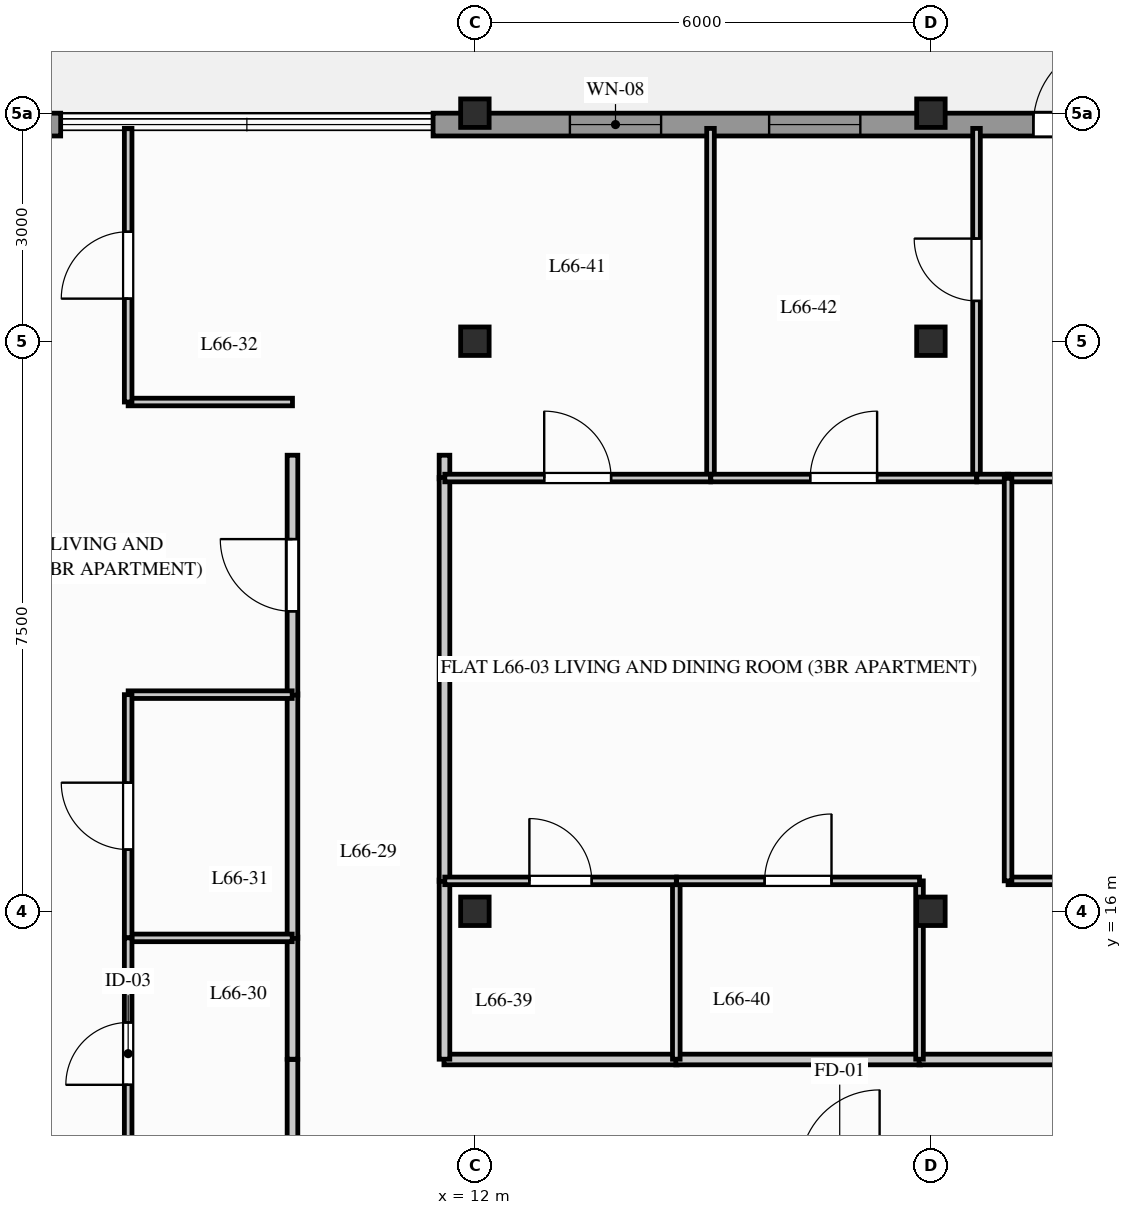
"""IFC4 building model, lengths in metres.
Left out: names, types, materials, properties, quantities, classifications, styles, units other than length and angle.
Written with IfcOpenShell. Run it as: python <this file> out.ifc"""

import sys

from ifc_helpers import new_model, si_unit, direction, frame, frame_2d, origin, origin_2d, place, context, subcontext, project, spatial, rectangle, i_section, extrude, element, fill, save


model = new_model("IFC4")
c1 = context("Model", 3, precision=1e-05, world=origin(), true_north=direction((0.0, 1.0)))
c2 = subcontext(c1, "Body", "Model", "MODEL_VIEW")
j1 = project(units=[si_unit("LENGTHUNIT", "METRE"), si_unit("PLANEANGLEUNIT", "RADIAN")], contexts=[c1])
p1 = place(None, origin())
s1 = spatial("IfcSite", under=j1, at=p1, CompositionType="ELEMENT")
p2 = place(p1, origin())
s2 = spatial("IfcBuilding", under=s1, at=p2, CompositionType="ELEMENT")
p3 = place(p2, frame((0.0, 0.0, 218.0)))
s3 = spatial("IfcBuildingStorey", under=s2, at=p3, CompositionType="ELEMENT", Elevation=218.0)
for number, where, z_axis, x_axis in (
    (1, (12.0, 16.0, 0.0), (0.0, 0.0, 1.0), (1.0, 0.0, 0.0)),
    (2, (12.0, 23.5, 0.0), (0.0, 0.0, 1.0), (1.0, 0.0, 0.0)),
    (3, (12.0, 26.5, 0.0), (0.0, 0.0, 1.0), (1.0, 0.0, 0.0)),
    (4, (18.0, 16.0, 0.0), (0.0, 0.0, 1.0), (1.0, 0.0, 0.0)),
    (5, (18.0, 23.5, 0.0), (0.0, 0.0, 1.0), (1.0, 0.0, 0.0)),
    (6, (18.0, 26.5, 0.0), (0.0, 0.0, 1.0), (1.0, 0.0, 0.0)),
):
    element("IfcColumn", number, at=place(p3, frame(where, z_axis=z_axis, x_axis=x_axis)), inside=s3, PredefinedType="COLUMN", context=c2, shape_type="SweptSolid", body=[
        extrude(i_section(OverallWidth=0.375, OverallDepth=0.375, WebThickness=0.017, FlangeThickness=0.027, FilletRadius=0.015, at=origin_2d()), origin(), (0.0, 0.0, 1.0), 3.1),
    ])
p4 = place(p3, frame((2.5, 26.35, 0.0), z_axis=(0.0, 0.0, 1.0), x_axis=(1.0, 0.0, 0.0)))
e7 = element("IfcWall", 7, at=p4, inside=s3, PredefinedType="STANDARD", context=c2, shape_type="SweptSolid", body=[
    extrude(rectangle(XDim=4.05, YDim=0.3, at=frame_2d((2.025, 0.0))), origin(), (0.0, 0.0, 1.0), 2.89),
])
p5 = place(p3, frame((11.45, 26.35, 0.0), z_axis=(0.0, 0.0, 1.0), x_axis=(1.0, 0.0, 0.0)))
e8 = element("IfcWall", 8, at=p5, inside=s3, PredefinedType="STANDARD", context=c2, shape_type="SweptSolid", body=[
    extrude(rectangle(XDim=16.35, YDim=0.3, at=frame_2d((8.175, 0.0))), origin(), (0.0, 0.0, 1.0), 2.332),
])
p6 = place(p5, frame((7.898, 0.0, 0.0)))
e9 = element("IfcOpeningElement", 9, at=p6, cuts=e8, PredefinedType="OPENING", context=c2, shape_type="SweptSolid", body=[
    extrude(rectangle(XDim=1.1, YDim=2.2, at=frame_2d((0.55, 1.1))), frame((0.0, 0.16, 0.0), z_axis=(0.0, -1.0, 0.0), x_axis=(1.0, 0.0, 0.0)), (0.0, 0.0, 1.0), 0.32),
])
p7 = place(p5, frame((1.8, 0.0, 0.512)))
e10 = element("IfcOpeningElement", 10, at=p7, cuts=e8, PredefinedType="OPENING", context=c2, shape_type="SweptSolid", body=[
    extrude(rectangle(XDim=1.2, YDim=1.6, at=frame_2d((0.6, 0.8))), frame((0.0, 0.16, 0.0), z_axis=(0.0, -1.0, 0.0), x_axis=(1.0, 0.0, 0.0)), (0.0, 0.0, 1.0), 0.32),
])
p8 = place(p5, frame((4.421, 0.0, 0.512)))
e11 = element("IfcOpeningElement", 11, at=p8, cuts=e8, PredefinedType="OPENING", context=c2, shape_type="SweptSolid", body=[
    extrude(rectangle(XDim=1.2, YDim=1.6, at=frame_2d((0.6, 0.8))), frame((0.0, 0.16, 0.0), z_axis=(0.0, -1.0, 0.0), x_axis=(1.0, 0.0, 0.0)), (0.0, 0.0, 1.0), 0.32),
])
p9 = place(p3, frame((9.6, 12.6, 0.0), z_axis=(0.0, 0.0, 1.0), x_axis=(0.0, 1.0, 0.0)))
e12 = element("IfcWall", 12, at=p9, inside=s3, PredefinedType="PARTITIONING", context=c2, shape_type="SweptSolid", body=[
    extrude(rectangle(XDim=1.45, YDim=0.14, at=frame_2d((0.725, 0.0))), origin(), (0.0, 0.0, 1.0), 2.89),
])
p10 = place(p3, frame((11.593, 14.05, 0.0), z_axis=(0.0, 0.0, 1.0), x_axis=(1.0, 0.0, 0.0)))
e13 = element("IfcWall", 13, at=p10, inside=s3, PredefinedType="PARTITIONING", context=c2, shape_type="SweptSolid", body=[
    extrude(rectangle(XDim=3.069, YDim=0.14, at=frame_2d((1.534, 0.0))), origin(), (0.0, 0.0, 1.0), 2.325),
])
p11 = place(p3, frame((14.643, 14.05, 0.0), z_axis=(0.0, 0.0, 1.0), x_axis=(1.0, 0.0, 0.0)))
e14 = element("IfcWall", 14, at=p11, inside=s3, PredefinedType="PARTITIONING", context=c2, shape_type="SweptSolid", body=[
    extrude(rectangle(XDim=3.219, YDim=0.14, at=frame_2d((1.609, 0.0))), origin(), (0.0, 0.0, 1.0), 2.89),
])
p12 = place(p3, frame((17.843, 14.05, 0.0), z_axis=(0.0, 0.0, 1.0), x_axis=(1.0, 0.0, 0.0)))
e15 = element("IfcWall", 15, at=p12, inside=s3, PredefinedType="PARTITIONING", context=c2, shape_type="SweptSolid", body=[
    extrude(rectangle(XDim=6.668, YDim=0.14, at=frame_2d((3.334, 0.0))), origin(), (0.0, 0.0, 1.0), 2.325),
])
p13 = place(p12, frame((2.859, 0.0, 0.0)))
e16 = element("IfcOpeningElement", 16, at=p13, cuts=e15, PredefinedType="OPENING", context=c2, shape_type="SweptSolid", body=[
    extrude(rectangle(XDim=0.95, YDim=2.05, at=frame_2d((0.475, 1.025))), frame((0.0, 0.08, 0.0), z_axis=(0.0, -1.0, 0.0), x_axis=(1.0, 0.0, 0.0)), (0.0, 0.0, 1.0), 0.16),
])
p14 = place(p3, frame((9.6, 14.054, 0.0), z_axis=(0.0, 0.0, 1.0), x_axis=(0.0, 1.0, 0.0)))
e17 = element("IfcWall", 17, at=p14, inside=s3, PredefinedType="PARTITIONING", context=c2, shape_type="SweptSolid", body=[
    extrude(rectangle(XDim=1.607, YDim=0.14, at=frame_2d((0.804, 0.0))), origin(), (0.0, 0.0, 1.0), 2.89),
])
p15 = place(p3, frame((9.6, 15.643, 0.0), z_axis=(0.0, 0.0, 1.0), x_axis=(0.0, 1.0, 0.0)))
e18 = element("IfcWall", 18, at=p15, inside=s3, PredefinedType="PARTITIONING", context=c2, shape_type="SweptSolid", body=[
    extrude(rectangle(XDim=3.219, YDim=0.14, at=frame_2d((1.609, 0.0))), origin(), (0.0, 0.0, 1.0), 2.325),
])
p16 = place(p3, frame((9.6, 18.843, 0.0), z_axis=(0.0, 0.0, 1.0), x_axis=(0.0, 1.0, 0.0)))
e19 = element("IfcWall", 19, at=p16, inside=s3, PredefinedType="PARTITIONING", context=c2, shape_type="SweptSolid", body=[
    extrude(rectangle(XDim=3.157, YDim=0.14, at=frame_2d((1.579, 0.0))), origin(), (0.0, 0.0, 1.0), 2.614),
])
p17 = place(p16, frame((1.104, 0.0, 0.0)))
e20 = element("IfcOpeningElement", 20, at=p17, cuts=e19, PredefinedType="OPENING", context=c2, shape_type="SweptSolid", body=[
    extrude(rectangle(XDim=0.95, YDim=2.05, at=frame_2d((0.475, 1.025))), frame((0.0, 0.08, 0.0), z_axis=(0.0, -1.0, 0.0), x_axis=(1.0, 0.0, 0.0)), (0.0, 0.0, 1.0), 0.16),
])
p18 = place(p3, frame((11.6, 14.054, 0.0), z_axis=(0.0, 0.0, 1.0), x_axis=(0.0, 1.0, 0.0)))
e21 = element("IfcWall", 21, at=p18, inside=s3, PredefinedType="PARTITIONING", context=c2, shape_type="SweptSolid", body=[
    extrude(rectangle(XDim=2.357, YDim=0.14, at=frame_2d((1.179, 0.0))), origin(), (0.0, 0.0, 1.0), 2.325),
])
p19 = place(p3, frame((11.6, 21.689, 0.0), z_axis=(0.0, 0.0, 1.0), x_axis=(0.0, 1.0, 0.0)))
e22 = element("IfcWall", 22, at=p19, inside=s3, PredefinedType="PARTITIONING", context=c2, shape_type="SweptSolid", body=[
    extrude(rectangle(XDim=0.311, YDim=0.14, at=frame_2d((0.156, 0.0))), origin(), (0.0, 0.0, 1.0), 2.89),
])
p20 = place(p3, frame((11.6, 16.393, 0.0), z_axis=(0.0, 0.0, 1.0), x_axis=(0.0, 1.0, 0.0)))
e23 = element("IfcWall", 23, at=p20, inside=s3, PredefinedType="PARTITIONING", context=c2, shape_type="SweptSolid", body=[
    extrude(rectangle(XDim=5.315, YDim=0.14, at=frame_2d((2.657, 0.0))), origin(), (0.0, 0.0, 1.0), 2.614),
])
p21 = place(p3, frame((7.438, 15.65, 0.0), z_axis=(0.0, 0.0, 1.0), x_axis=(1.0, 0.0, 0.0)))
e24 = element("IfcWall", 24, at=p21, inside=s3, PredefinedType="PARTITIONING", context=c2, shape_type="SweptSolid", body=[
    extrude(rectangle(XDim=2.158, YDim=0.1, at=frame_2d((1.079, 0.0))), origin(), (0.0, 0.0, 1.0), 2.89),
])
p22 = place(p3, frame((7.438, 12.604, 0.0), z_axis=(0.0, 0.0, 1.0), x_axis=(0.0, 1.0, 0.0)))
e25 = element("IfcWall", 25, at=p22, inside=s3, PredefinedType="PARTITIONING", context=c2, shape_type="SweptSolid", body=[
    extrude(rectangle(XDim=3.046, YDim=0.1, at=frame_2d((1.523, 0.0))), origin(), (0.0, 0.0, 1.0), 2.89),
])
p23 = place(p22, frame((1.113, 0.0, 0.0)))
e26 = element("IfcOpeningElement", 26, at=p23, cuts=e25, PredefinedType="OPENING", context=c2, shape_type="SweptSolid", body=[
    extrude(rectangle(XDim=0.82, YDim=2.02, at=frame_2d((0.41, 1.01))), frame((0.0, 0.06, 0.0), z_axis=(0.0, -1.0, 0.0), x_axis=(1.0, 0.0, 0.0)), (0.0, 0.0, 1.0), 0.12),
])
p24 = place(p3, frame((7.438, 18.85, 0.0), z_axis=(0.0, 0.0, 1.0), x_axis=(1.0, 0.0, 0.0)))
e27 = element("IfcWall", 27, at=p24, inside=s3, PredefinedType="PARTITIONING", context=c2, shape_type="SweptSolid", body=[
    extrude(rectangle(XDim=2.158, YDim=0.1, at=frame_2d((1.079, 0.0))), origin(), (0.0, 0.0, 1.0), 2.89),
])
p25 = place(p3, frame((7.438, 15.654, 0.0), z_axis=(0.0, 0.0, 1.0), x_axis=(0.0, 1.0, 0.0)))
e28 = element("IfcWall", 28, at=p25, inside=s3, PredefinedType="PARTITIONING", context=c2, shape_type="SweptSolid", body=[
    extrude(rectangle(XDim=3.196, YDim=0.1, at=frame_2d((1.598, 0.0))), origin(), (0.0, 0.0, 1.0), 2.325),
])
p26 = place(p25, frame((1.158, 0.0, 0.0)))
e29 = element("IfcOpeningElement", 29, at=p26, cuts=e28, PredefinedType="OPENING", context=c2, shape_type="SweptSolid", body=[
    extrude(rectangle(XDim=0.88, YDim=2.04, at=frame_2d((0.44, 1.02))), frame((0.0, 0.06, 0.0), z_axis=(0.0, -1.0, 0.0), x_axis=(1.0, 0.0, 0.0)), (0.0, 0.0, 1.0), 0.12),
])
p27 = place(p3, frame((7.438, 22.7, 0.0), z_axis=(0.0, 0.0, 1.0), x_axis=(1.0, 0.0, 0.0)))
e30 = element("IfcWall", 30, at=p27, inside=s3, PredefinedType="PARTITIONING", context=c2, shape_type="SweptSolid", body=[
    extrude(rectangle(XDim=2.162, YDim=0.1, at=frame_2d((1.081, 0.0))), origin(), (0.0, 0.0, 1.0), 2.89),
])
p28 = place(p3, frame((7.438, 22.7, 0.0), z_axis=(0.0, 0.0, 1.0), x_axis=(0.0, 1.0, 0.0)))
e31 = element("IfcWall", 31, at=p28, inside=s3, PredefinedType="PARTITIONING", context=c2, shape_type="SweptSolid", body=[
    extrude(rectangle(XDim=3.6, YDim=0.1, at=frame_2d((1.8, 0.0))), origin(), (0.0, 0.0, 1.0), 2.325),
])
p29 = place(p28, frame((1.36, 0.0, 0.0)))
e32 = element("IfcOpeningElement", 32, at=p29, cuts=e31, PredefinedType="OPENING", context=c2, shape_type="SweptSolid", body=[
    extrude(rectangle(XDim=0.88, YDim=2.04, at=frame_2d((0.44, 1.02))), frame((0.0, 0.06, 0.0), z_axis=(0.0, -1.0, 0.0), x_axis=(1.0, 0.0, 0.0)), (0.0, 0.0, 1.0), 0.12),
])
p30 = place(p3, frame((14.65, 14.054, 0.0), z_axis=(0.0, 0.0, 1.0), x_axis=(0.0, 1.0, 0.0)))
e33 = element("IfcWall", 33, at=p30, inside=s3, PredefinedType="PARTITIONING", context=c2, shape_type="SweptSolid", body=[
    extrude(rectangle(XDim=2.346, YDim=0.1, at=frame_2d((1.173, 0.0))), origin(), (0.0, 0.0, 1.0), 2.325),
])
p31 = place(p3, frame((11.604, 16.4, 0.0), z_axis=(0.0, 0.0, 1.0), x_axis=(1.0, 0.0, 0.0)))
e34 = element("IfcWall", 34, at=p31, inside=s3, PredefinedType="PARTITIONING", context=c2, shape_type="SweptSolid", body=[
    extrude(rectangle(XDim=3.046, YDim=0.1, at=frame_2d((1.523, 0.0))), origin(), (0.0, 0.0, 1.0), 2.325),
])
p32 = place(p31, frame((1.113, 0.0, 0.0)))
e35 = element("IfcOpeningElement", 35, at=p32, cuts=e34, PredefinedType="OPENING", context=c2, shape_type="SweptSolid", body=[
    extrude(rectangle(XDim=0.82, YDim=2.02, at=frame_2d((0.41, 1.01))), frame((0.0, 0.06, 0.0), z_axis=(0.0, -1.0, 0.0), x_axis=(1.0, 0.0, 0.0)), (0.0, 0.0, 1.0), 0.12),
])
p33 = place(p3, frame((17.85, 14.054, 0.0), z_axis=(0.0, 0.0, 1.0), x_axis=(0.0, 1.0, 0.0)))
e36 = element("IfcWall", 36, at=p33, inside=s3, PredefinedType="PARTITIONING", context=c2, shape_type="SweptSolid", body=[
    extrude(rectangle(XDim=2.346, YDim=0.1, at=frame_2d((1.173, 0.0))), origin(), (0.0, 0.0, 1.0), 2.325),
])
p34 = place(p3, frame((14.654, 16.4, 0.0), z_axis=(0.0, 0.0, 1.0), x_axis=(1.0, 0.0, 0.0)))
e37 = element("IfcWall", 37, at=p34, inside=s3, PredefinedType="PARTITIONING", context=c2, shape_type="SweptSolid", body=[
    extrude(rectangle(XDim=3.196, YDim=0.1, at=frame_2d((1.598, 0.0))), origin(), (0.0, 0.0, 1.0), 2.89),
])
p35 = place(p34, frame((1.158, 0.0, 0.0)))
e38 = element("IfcOpeningElement", 38, at=p35, cuts=e37, PredefinedType="OPENING", context=c2, shape_type="SweptSolid", body=[
    extrude(rectangle(XDim=0.88, YDim=2.04, at=frame_2d((0.44, 1.02))), frame((0.0, 0.06, 0.0), z_axis=(0.0, -1.0, 0.0), x_axis=(1.0, 0.0, 0.0)), (0.0, 0.0, 1.0), 0.12),
])
p36 = place(p3, frame((15.1, 21.7, 0.0), z_axis=(0.0, 0.0, 1.0), x_axis=(0.0, 1.0, 0.0)))
e39 = element("IfcWall", 39, at=p36, inside=s3, PredefinedType="PARTITIONING", context=c2, shape_type="SweptSolid", body=[
    extrude(rectangle(XDim=4.6, YDim=0.1, at=frame_2d((2.3, 0.0))), origin(), (0.0, 0.0, 1.0), 2.325),
])
p37 = place(p3, frame((11.604, 21.7, 0.0), z_axis=(0.0, 0.0, 1.0), x_axis=(1.0, 0.0, 0.0)))
e40 = element("IfcWall", 40, at=p37, inside=s3, PredefinedType="PARTITIONING", context=c2, shape_type="SweptSolid", body=[
    extrude(rectangle(XDim=3.496, YDim=0.1, at=frame_2d((1.748, 0.0))), origin(), (0.0, 0.0, 1.0), 2.325),
])
p38 = place(p37, frame((1.308, 0.0, 0.0)))
e41 = element("IfcOpeningElement", 41, at=p38, cuts=e40, PredefinedType="OPENING", context=c2, shape_type="SweptSolid", body=[
    extrude(rectangle(XDim=0.88, YDim=2.04, at=frame_2d((0.44, 1.02))), frame((0.0, 0.06, 0.0), z_axis=(0.0, -1.0, 0.0), x_axis=(1.0, 0.0, 0.0)), (0.0, 0.0, 1.0), 0.12),
])
p39 = place(p3, frame((18.6, 21.7, 0.0), z_axis=(0.0, 0.0, 1.0), x_axis=(0.0, 1.0, 0.0)))
e42 = element("IfcWall", 42, at=p39, inside=s3, PredefinedType="PARTITIONING", context=c2, shape_type="SweptSolid", body=[
    extrude(rectangle(XDim=4.6, YDim=0.1, at=frame_2d((2.3, 0.0))), origin(), (0.0, 0.0, 1.0), 2.325),
])
p40 = place(p39, frame((2.33, 0.0, 0.0)))
e43 = element("IfcOpeningElement", 43, at=p40, cuts=e42, PredefinedType="OPENING", context=c2, shape_type="SweptSolid", body=[
    extrude(rectangle(XDim=0.82, YDim=2.02, at=frame_2d((0.41, 1.01))), frame((0.0, 0.06, 0.0), z_axis=(0.0, -1.0, 0.0), x_axis=(1.0, 0.0, 0.0)), (0.0, 0.0, 1.0), 0.12),
])
p41 = place(p3, frame((15.104, 21.7, 0.0), z_axis=(0.0, 0.0, 1.0), x_axis=(1.0, 0.0, 0.0)))
e44 = element("IfcWall", 44, at=p41, inside=s3, PredefinedType="PARTITIONING", context=c2, shape_type="SweptSolid", body=[
    extrude(rectangle(XDim=3.496, YDim=0.1, at=frame_2d((1.748, 0.0))), origin(), (0.0, 0.0, 1.0), 2.325),
])
p42 = place(p41, frame((1.308, 0.0, 0.0)))
e45 = element("IfcOpeningElement", 45, at=p42, cuts=e44, PredefinedType="OPENING", context=c2, shape_type="SweptSolid", body=[
    extrude(rectangle(XDim=0.88, YDim=2.04, at=frame_2d((0.44, 1.02))), frame((0.0, 0.06, 0.0), z_axis=(0.0, -1.0, 0.0), x_axis=(1.0, 0.0, 0.0)), (0.0, 0.0, 1.0), 0.12),
])
p43 = place(p3, frame((19.004, 21.7, 0.0), z_axis=(0.0, 0.0, 1.0), x_axis=(1.0, 0.0, 0.0)))
e46 = element("IfcWall", 46, at=p43, inside=s3, PredefinedType="PARTITIONING", context=c2, shape_type="SweptSolid", body=[
    extrude(rectangle(XDim=3.096, YDim=0.1, at=frame_2d((1.548, 0.0))), origin(), (0.0, 0.0, 1.0), 2.325),
])
p44 = place(p3, frame((18.604, 21.7, 0.0), z_axis=(0.0, 0.0, 1.0), x_axis=(1.0, 0.0, 0.0)))
e47 = element("IfcWall", 47, at=p44, inside=s3, PredefinedType="PARTITIONING", context=c2, shape_type="SweptSolid", body=[
    extrude(rectangle(XDim=0.418, YDim=0.1, at=frame_2d((0.209, 0.0))), origin(), (0.0, 0.0, 1.0), 2.89),
])
p45 = place(p3, frame((19.015, 16.4, 0.0), z_axis=(0.0, 0.0, 1.0), x_axis=(1.0, 0.0, 0.0)))
e48 = element("IfcWall", 48, at=p45, inside=s3, PredefinedType="PARTITIONING", context=c2, shape_type="SweptSolid", body=[
    extrude(rectangle(XDim=5.485, YDim=0.1, at=frame_2d((2.743, 0.0))), origin(), (0.0, 0.0, 1.0), 2.325),
])
p46 = place(p45, frame((1.423, 0.0, 0.0)))
e49 = element("IfcOpeningElement", 49, at=p46, cuts=e48, PredefinedType="OPENING", context=c2, shape_type="SweptSolid", body=[
    extrude(rectangle(XDim=0.88, YDim=2.04, at=frame_2d((0.44, 1.02))), frame((0.0, 0.06, 0.0), z_axis=(0.0, -1.0, 0.0), x_axis=(1.0, 0.0, 0.0)), (0.0, 0.0, 1.0), 0.12),
])
p47 = place(p3, frame((19.015, 16.4, 0.0), z_axis=(0.0, 0.0, 1.0), x_axis=(0.0, 1.0, 0.0)))
e50 = element("IfcWall", 50, at=p47, inside=s3, PredefinedType="PARTITIONING", context=c2, shape_type="SweptSolid", body=[
    extrude(rectangle(XDim=5.296, YDim=0.1, at=frame_2d((2.648, 0.0))), origin(), (0.0, 0.0, 1.0), 2.614),
])
p48 = place(p6, origin())
e51 = element("IfcDoor", 51, at=p48, inside=s3, OperationType="SINGLE_SWING_RIGHT", PredefinedType="DOOR", context=c2, shape_type="SweptSolid", body=[
    extrude(rectangle(XDim=1.1, YDim=2.2, at=frame_2d((0.55, 1.1))), frame((0.0, 0.025, 0.0), z_axis=(0.0, -1.0, 0.0), x_axis=(1.0, 0.0, 0.0)), (0.0, 0.0, 1.0), 0.05),
])
fill(e9, e51)
p49 = place(p7, origin())
e52 = element("IfcWindow", 52, at=p49, inside=s3, PartitioningType="SINGLE_PANEL", PredefinedType="WINDOW", context=c2, shape_type="SweptSolid", body=[
    extrude(rectangle(XDim=1.2, YDim=1.6, at=frame_2d((0.6, 0.8))), frame((0.0, 0.03, 0.0), z_axis=(0.0, -1.0, 0.0), x_axis=(1.0, 0.0, 0.0)), (0.0, 0.0, 1.0), 0.06),
])
fill(e10, e52)
p50 = place(p17, origin())
e53 = element("IfcDoor", 53, at=p50, inside=s3, OperationType="SINGLE_SWING_RIGHT", PredefinedType="DOOR", context=c2, shape_type="SweptSolid", body=[
    extrude(rectangle(XDim=0.95, YDim=2.05, at=frame_2d((0.475, 1.025))), frame((0.0, 0.025, 0.0), z_axis=(0.0, -1.0, 0.0), x_axis=(1.0, 0.0, 0.0)), (0.0, 0.0, 1.0), 0.05),
])
fill(e20, e53)
p51 = place(p23, origin())
e54 = element("IfcDoor", 54, at=p51, inside=s3, OperationType="SINGLE_SWING_LEFT", PredefinedType="DOOR", context=c2, shape_type="SweptSolid", body=[
    extrude(rectangle(XDim=0.82, YDim=2.02, at=frame_2d((0.41, 1.01))), frame((0.0, 0.025, 0.0), z_axis=(0.0, -1.0, 0.0), x_axis=(1.0, 0.0, 0.0)), (0.0, 0.0, 1.0), 0.05),
])
fill(e26, e54)
p52 = place(p26, origin())
e55 = element("IfcDoor", 55, at=p52, inside=s3, OperationType="SINGLE_SWING_RIGHT", PredefinedType="DOOR", context=c2, shape_type="SweptSolid", body=[
    extrude(rectangle(XDim=0.88, YDim=2.04, at=frame_2d((0.44, 1.02))), frame((0.0, 0.025, 0.0), z_axis=(0.0, -1.0, 0.0), x_axis=(1.0, 0.0, 0.0)), (0.0, 0.0, 1.0), 0.05),
])
fill(e29, e55)
p53 = place(p29, origin())
e56 = element("IfcDoor", 56, at=p53, inside=s3, OperationType="SINGLE_SWING_LEFT", PredefinedType="DOOR", context=c2, shape_type="SweptSolid", body=[
    extrude(rectangle(XDim=0.88, YDim=2.04, at=frame_2d((0.44, 1.02))), frame((0.0, 0.025, 0.0), z_axis=(0.0, -1.0, 0.0), x_axis=(1.0, 0.0, 0.0)), (0.0, 0.0, 1.0), 0.05),
])
fill(e32, e56)
p54 = place(p32, origin())
e57 = element("IfcDoor", 57, at=p54, inside=s3, OperationType="SINGLE_SWING_LEFT", PredefinedType="DOOR", context=c2, shape_type="SweptSolid", body=[
    extrude(rectangle(XDim=0.82, YDim=2.02, at=frame_2d((0.41, 1.01))), frame((0.0, 0.025, 0.0), z_axis=(0.0, -1.0, 0.0), x_axis=(1.0, 0.0, 0.0)), (0.0, 0.0, 1.0), 0.05),
])
fill(e35, e57)
p55 = place(p35, origin())
e58 = element("IfcDoor", 58, at=p55, inside=s3, OperationType="SINGLE_SWING_RIGHT", PredefinedType="DOOR", context=c2, shape_type="SweptSolid", body=[
    extrude(rectangle(XDim=0.88, YDim=2.04, at=frame_2d((0.44, 1.02))), frame((0.0, 0.025, 0.0), z_axis=(0.0, -1.0, 0.0), x_axis=(1.0, 0.0, 0.0)), (0.0, 0.0, 1.0), 0.05),
])
fill(e38, e58)
p56 = place(p38, origin())
e59 = element("IfcDoor", 59, at=p56, inside=s3, OperationType="SINGLE_SWING_LEFT", PredefinedType="DOOR", context=c2, shape_type="SweptSolid", body=[
    extrude(rectangle(XDim=0.88, YDim=2.04, at=frame_2d((0.44, 1.02))), frame((0.0, 0.025, 0.0), z_axis=(0.0, -1.0, 0.0), x_axis=(1.0, 0.0, 0.0)), (0.0, 0.0, 1.0), 0.05),
])
fill(e41, e59)
p57 = place(p42, origin())
e60 = element("IfcDoor", 60, at=p57, inside=s3, OperationType="SINGLE_SWING_RIGHT", PredefinedType="DOOR", context=c2, shape_type="SweptSolid", body=[
    extrude(rectangle(XDim=0.88, YDim=2.04, at=frame_2d((0.44, 1.02))), frame((0.0, 0.025, 0.0), z_axis=(0.0, -1.0, 0.0), x_axis=(1.0, 0.0, 0.0)), (0.0, 0.0, 1.0), 0.05),
])
fill(e45, e60)
p58 = place(p40, origin())
e61 = element("IfcDoor", 61, at=p58, inside=s3, OperationType="SINGLE_SWING_RIGHT", PredefinedType="DOOR", context=c2, shape_type="SweptSolid", body=[
    extrude(rectangle(XDim=0.82, YDim=2.02, at=frame_2d((0.41, 1.01))), frame((0.0, 0.025, 0.0), z_axis=(0.0, -1.0, 0.0), x_axis=(1.0, 0.0, 0.0)), (0.0, 0.0, 1.0), 0.05),
])
fill(e43, e61)
p59 = place(p8, origin())
e62 = element("IfcWindow", 62, at=p59, inside=s3, PartitioningType="SINGLE_PANEL", PredefinedType="WINDOW", context=c2, shape_type="SweptSolid", body=[
    extrude(rectangle(XDim=1.2, YDim=1.6, at=frame_2d((0.6, 0.8))), frame((0.0, 0.03, 0.0), z_axis=(0.0, -1.0, 0.0), x_axis=(1.0, 0.0, 0.0)), (0.0, 0.0, 1.0), 0.06),
])
fill(e11, e62)
save(model, sys.argv[1])
